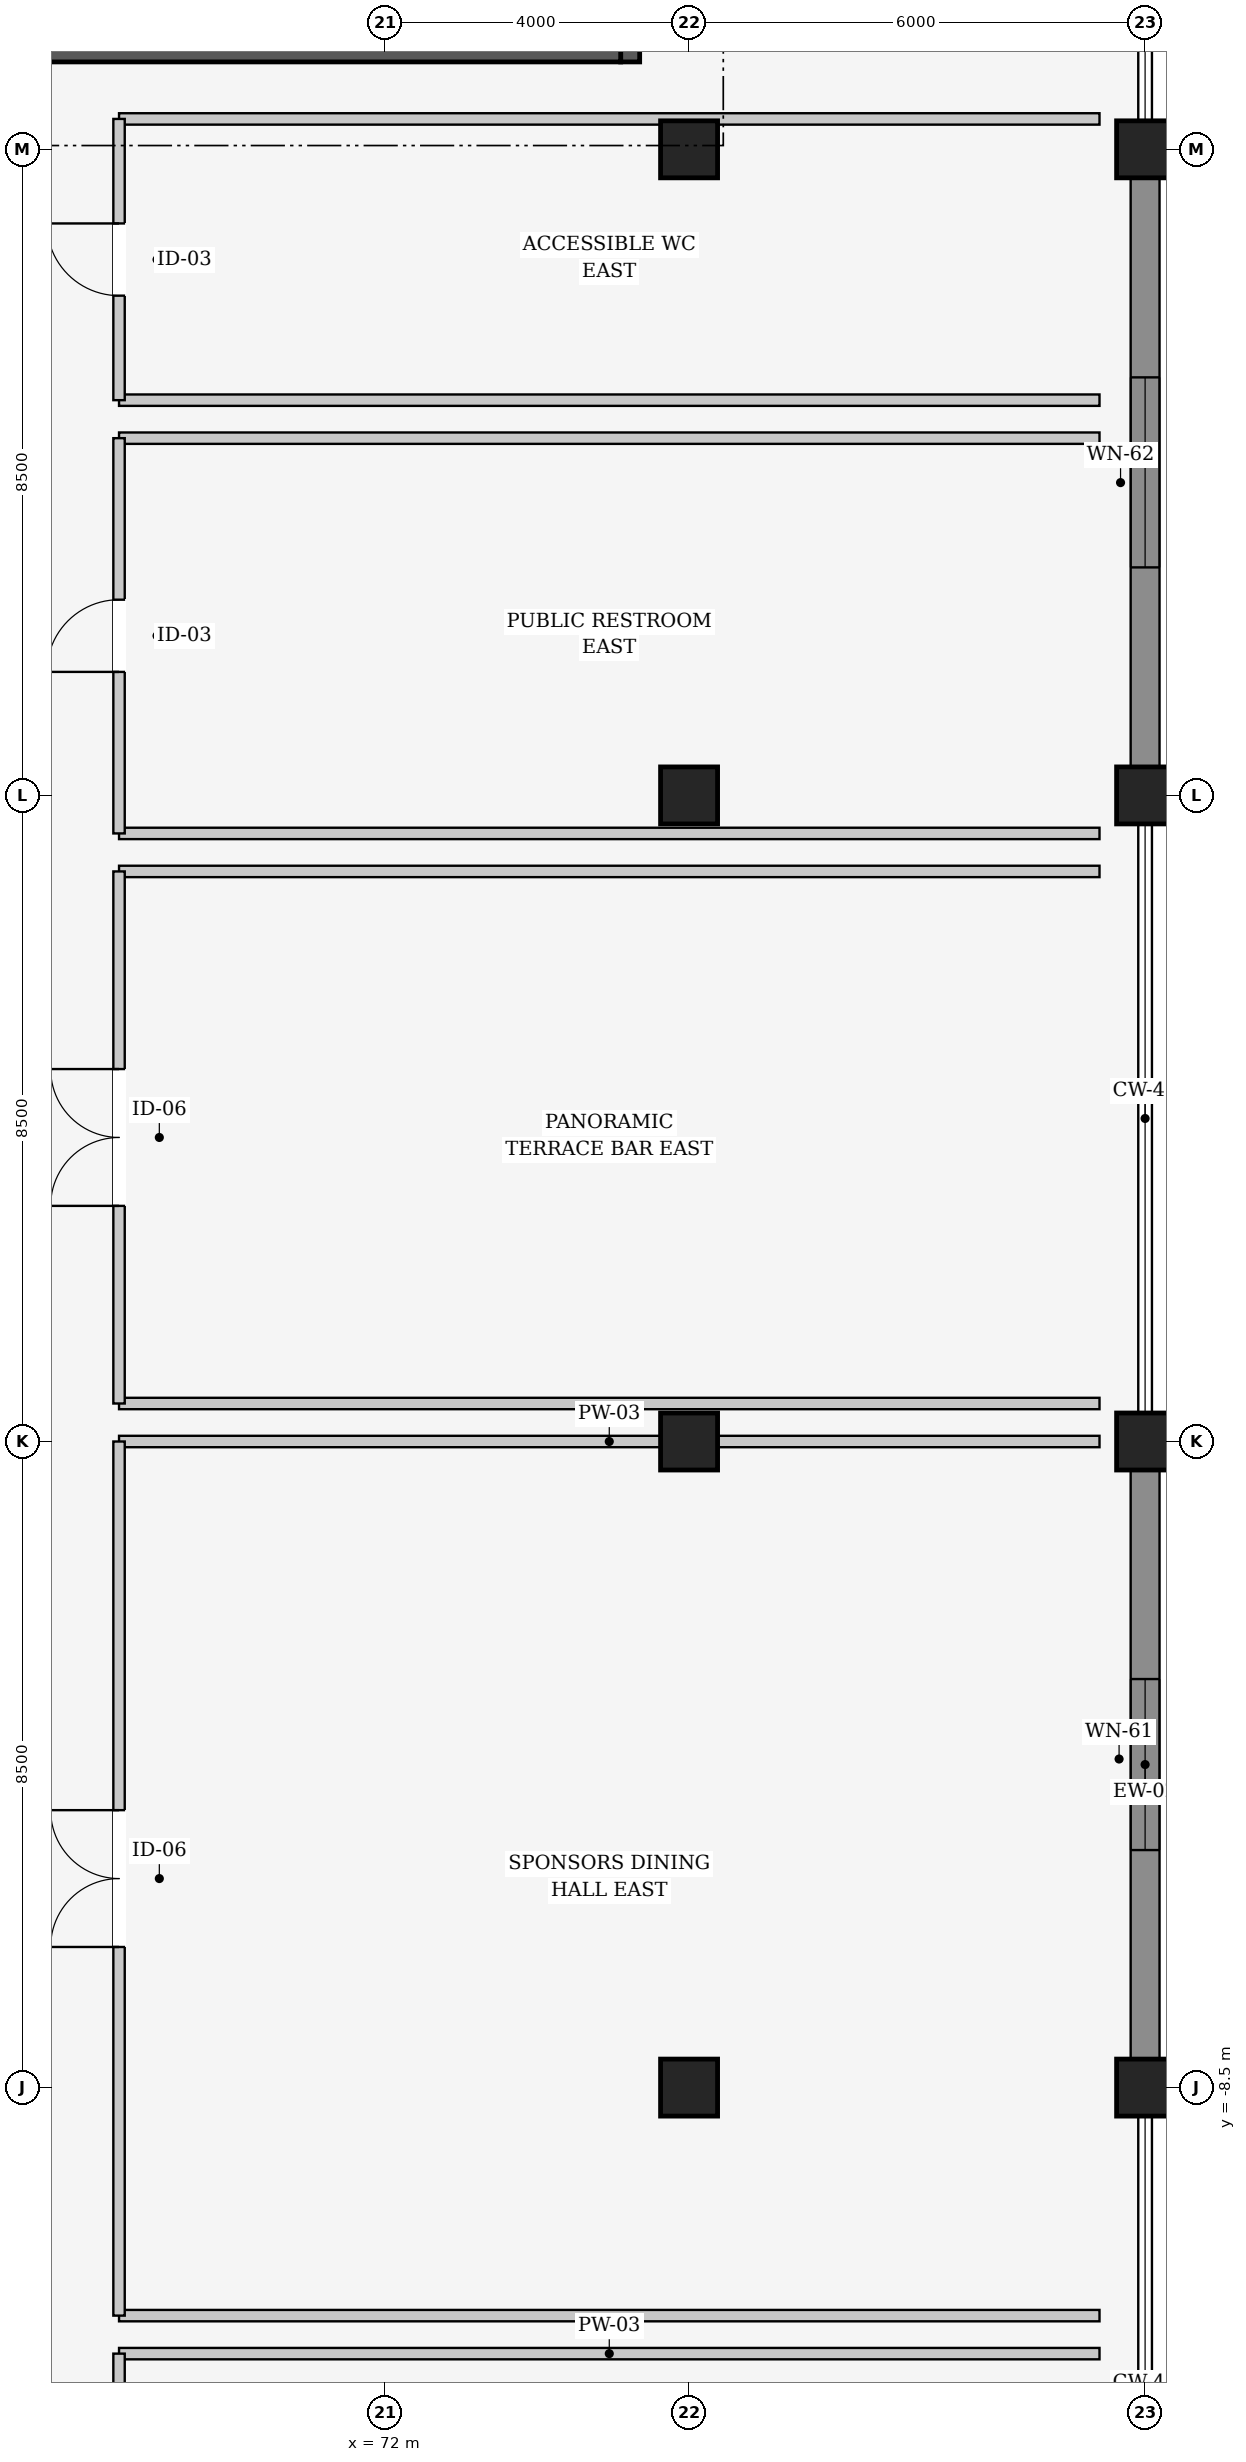
"""IFC4 building model, lengths in metres.
Left out: names, types, materials, properties, quantities, classifications, styles, units other than length and angle.
Written with IfcOpenShell. Run it as: python <this file> out.ifc"""

import sys

from ifc_helpers import new_model, si_unit, direction, frame, frame_2d, origin, origin_2d, place, context, subcontext, project, spatial, rectangle, extrude, element, fill, save


model = new_model("IFC4")
c1 = context("Model", 3, precision=1e-05, world=origin(), true_north=direction((0.0, 1.0)))
c2 = subcontext(c1, "Body", "Model", "MODEL_VIEW")
j1 = project(units=[si_unit("LENGTHUNIT", "METRE"), si_unit("PLANEANGLEUNIT", "RADIAN")], contexts=[c1])
p1 = place(None, origin())
s1 = spatial("IfcSite", under=j1, at=p1, CompositionType="ELEMENT")
p2 = place(p1, origin())
s2 = spatial("IfcBuilding", under=s1, at=p2, CompositionType="ELEMENT")
p3 = place(p2, frame((0.0, 0.0, 21.0)))
s3 = spatial("IfcBuildingStorey", under=s2, at=p3, CompositionType="ELEMENT", Elevation=21.0)
for number, where, z_axis, x_axis in (
    (1, (76.0, -8.5, 0.0), (0.0, 0.0, 1.0), (1.0, 0.0, 0.0)),
    (2, (76.0, 0.0, 0.0), (0.0, 0.0, 1.0), (1.0, 0.0, 0.0)),
    (3, (76.0, 8.5, 0.0), (0.0, 0.0, 1.0), (1.0, 0.0, 0.0)),
    (4, (76.0, 17.0, 0.0), (0.0, 0.0, 1.0), (1.0, 0.0, 0.0)),
    (5, (82.0, -8.5, 0.0), (0.0, 0.0, 1.0), (1.0, 0.0, 0.0)),
    (6, (82.0, 0.0, 0.0), (0.0, 0.0, 1.0), (1.0, 0.0, 0.0)),
    (7, (82.0, 8.5, 0.0), (0.0, 0.0, 1.0), (1.0, 0.0, 0.0)),
    (8, (82.0, 17.0, 0.0), (0.0, 0.0, 1.0), (1.0, 0.0, 0.0)),
):
    element("IfcColumn", number, at=place(p3, frame(where, z_axis=z_axis, x_axis=x_axis)), inside=s3, PredefinedType="COLUMN", context=c2, shape_type="SweptSolid", body=[
        extrude(rectangle(XDim=0.75, YDim=0.75, at=origin_2d()), origin(), (0.0, 0.0, 1.0), 5.4),
    ])
p4 = place(p3, frame((82.0, -0.357, 0.0), z_axis=(0.0, 0.0, 1.0), x_axis=(0.0, -1.0, 0.0)))
e9 = element("IfcWall", 9, at=p4, inside=s3, PredefinedType="SOLIDWALL", context=c2, shape_type="SweptSolid", body=[
    extrude(rectangle(XDim=7.786, YDim=0.38, at=frame_2d((3.893, 0.0))), origin(), (0.0, 0.0, 1.0), 4.36),
])
p5 = place(p4, frame((2.768, 0.0, 0.9)))
e10 = element("IfcOpeningElement", 10, at=p5, cuts=e9, PredefinedType="OPENING", context=c2, shape_type="SweptSolid", body=[
    extrude(rectangle(XDim=2.25, YDim=2.8, at=frame_2d((1.125, 1.4))), frame((0.0, 0.2, 0.0), z_axis=(0.0, -1.0, 0.0), x_axis=(1.0, 0.0, 0.0)), (0.0, 0.0, 1.0), 0.4),
])
p6 = place(p3, frame((82.0, 16.643, 0.0), z_axis=(0.0, 0.0, 1.0), x_axis=(0.0, -1.0, 0.0)))
e11 = element("IfcWall", 11, at=p6, inside=s3, PredefinedType="SOLIDWALL", context=c2, shape_type="SweptSolid", body=[
    extrude(rectangle(XDim=7.786, YDim=0.38, at=frame_2d((3.893, 0.0))), origin(), (0.0, 0.0, 1.0), 4.36),
])
p7 = place(p6, frame((2.643, 0.0, 0.9)))
e12 = element("IfcOpeningElement", 12, at=p7, cuts=e11, PredefinedType="OPENING", context=c2, shape_type="SweptSolid", body=[
    extrude(rectangle(XDim=2.5, YDim=2.8, at=frame_2d((1.25, 1.4))), frame((0.0, 0.2, 0.0), z_axis=(0.0, -1.0, 0.0), x_axis=(1.0, 0.0, 0.0)), (0.0, 0.0, 1.0), 0.4),
])
p8 = place(p3, frame((75.225, 23.85, 0.0), z_axis=(0.0, 0.0, 1.0), x_axis=(0.0, -1.0, 0.0)))
e13 = element("IfcWall", 13, at=p8, inside=s3, PredefinedType="SHEAR", context=c2, shape_type="SweptSolid", body=[
    extrude(rectangle(XDim=5.7, YDim=0.25, at=frame_2d((2.85, 0.0))), origin(), (0.0, 0.0, 1.0), 5.4),
])
p9 = place(p3, frame((75.1, 18.275, 0.0), z_axis=(0.0, 0.0, 1.0), x_axis=(-1.0, 0.0, 0.0)))
e14 = element("IfcWall", 14, at=p9, inside=s3, PredefinedType="SHEAR", context=c2, shape_type="SweptSolid", body=[
    extrude(rectangle(XDim=10.2, YDim=0.25, at=frame_2d((5.1, 0.0))), origin(), (0.0, 0.0, 1.0), 5.4),
])
p10 = place(p3, frame((68.5, -12.0, 0.0), z_axis=(0.0, 0.0, 1.0), x_axis=(1.0, 0.0, 0.0)))
e15 = element("IfcWall", 15, at=p10, inside=s3, PredefinedType="PARTITIONING", context=c2, shape_type="SweptSolid", body=[
    extrude(rectangle(XDim=12.9, YDim=0.15, at=frame_2d((6.45, 0.0))), origin(), (0.0, 0.0, 1.0), 4.445),
])
p11 = place(p3, frame((68.5, -24.4, 0.0), z_axis=(0.0, 0.0, 1.0), x_axis=(0.0, 1.0, 0.0)))
e16 = element("IfcWall", 16, at=p11, inside=s3, PredefinedType="PARTITIONING", context=c2, shape_type="SweptSolid", body=[
    extrude(rectangle(XDim=12.4, YDim=0.15, at=frame_2d((6.2, 0.0))), origin(), (0.0, 0.0, 1.0), 4.145),
])
p12 = place(p11, frame((5.3, 0.0, 0.0)))
e17 = element("IfcOpeningElement", 17, at=p12, cuts=e16, PredefinedType="OPENING", context=c2, shape_type="SweptSolid", body=[
    extrude(rectangle(XDim=1.8, YDim=2.2, at=frame_2d((0.9, 1.1))), frame((0.0, 0.085, 0.0), z_axis=(0.0, -1.0, 0.0), x_axis=(1.0, 0.0, 0.0)), (0.0, 0.0, 1.0), 0.17),
])
p13 = place(p3, frame((68.5, 0.0, 0.0), z_axis=(0.0, 0.0, 1.0), x_axis=(1.0, 0.0, 0.0)))
e18 = element("IfcWall", 18, at=p13, inside=s3, PredefinedType="PARTITIONING", context=c2, shape_type="SweptSolid", body=[
    extrude(rectangle(XDim=12.9, YDim=0.15, at=frame_2d((6.45, 0.0))), origin(), (0.0, 0.0, 1.0), 4.145),
])
p14 = place(p3, frame((81.4, -11.5, 0.0), z_axis=(0.0, 0.0, 1.0), x_axis=(-1.0, 0.0, 0.0)))
e19 = element("IfcWall", 19, at=p14, inside=s3, PredefinedType="PARTITIONING", context=c2, shape_type="SweptSolid", body=[
    extrude(rectangle(XDim=12.9, YDim=0.15, at=frame_2d((6.45, 0.0))), origin(), (0.0, 0.0, 1.0), 4.445),
])
p15 = place(p3, frame((68.5, -11.5, 0.0), z_axis=(0.0, 0.0, 1.0), x_axis=(0.0, 1.0, 0.0)))
e20 = element("IfcWall", 20, at=p15, inside=s3, PredefinedType="PARTITIONING", context=c2, shape_type="SweptSolid", body=[
    extrude(rectangle(XDim=11.5, YDim=0.15, at=frame_2d((5.75, 0.0))), origin(), (0.0, 0.0, 1.0), 4.145),
])
p16 = place(p15, frame((4.85, 0.0, 0.0)))
e21 = element("IfcOpeningElement", 21, at=p16, cuts=e20, PredefinedType="OPENING", context=c2, shape_type="SweptSolid", body=[
    extrude(rectangle(XDim=1.8, YDim=2.2, at=frame_2d((0.9, 1.1))), frame((0.0, 0.085, 0.0), z_axis=(0.0, -1.0, 0.0), x_axis=(1.0, 0.0, 0.0)), (0.0, 0.0, 1.0), 0.17),
])
p17 = place(p3, frame((68.5, 7.5, 0.0), z_axis=(0.0, 0.0, 1.0), x_axis=(1.0, 0.0, 0.0)))
e22 = element("IfcWall", 22, at=p17, inside=s3, PredefinedType="PARTITIONING", context=c2, shape_type="SweptSolid", body=[
    extrude(rectangle(XDim=12.9, YDim=0.15, at=frame_2d((6.45, 0.0))), origin(), (0.0, 0.0, 1.0), 4.445),
])
p18 = place(p3, frame((81.4, 0.5, 0.0), z_axis=(0.0, 0.0, 1.0), x_axis=(-1.0, 0.0, 0.0)))
e23 = element("IfcWall", 23, at=p18, inside=s3, PredefinedType="PARTITIONING", context=c2, shape_type="SweptSolid", body=[
    extrude(rectangle(XDim=12.9, YDim=0.15, at=frame_2d((6.45, 0.0))), origin(), (0.0, 0.0, 1.0), 4.145),
])
p19 = place(p3, frame((68.5, 0.5, 0.0), z_axis=(0.0, 0.0, 1.0), x_axis=(0.0, 1.0, 0.0)))
e24 = element("IfcWall", 24, at=p19, inside=s3, PredefinedType="PARTITIONING", context=c2, shape_type="SweptSolid", body=[
    extrude(rectangle(XDim=7.0, YDim=0.15, at=frame_2d((3.5, 0.0))), origin(), (0.0, 0.0, 1.0), 4.145),
])
p20 = place(p19, frame((2.6, 0.0, 0.0)))
e25 = element("IfcOpeningElement", 25, at=p20, cuts=e24, PredefinedType="OPENING", context=c2, shape_type="SweptSolid", body=[
    extrude(rectangle(XDim=1.8, YDim=2.2, at=frame_2d((0.9, 1.1))), frame((0.0, 0.085, 0.0), z_axis=(0.0, -1.0, 0.0), x_axis=(1.0, 0.0, 0.0)), (0.0, 0.0, 1.0), 0.17),
])
p21 = place(p3, frame((68.5, 13.2, 0.0), z_axis=(0.0, 0.0, 1.0), x_axis=(1.0, 0.0, 0.0)))
e26 = element("IfcWall", 26, at=p21, inside=s3, PredefinedType="PARTITIONING", context=c2, shape_type="SweptSolid", body=[
    extrude(rectangle(XDim=12.9, YDim=0.15, at=frame_2d((6.45, 0.0))), origin(), (0.0, 0.0, 1.0), 4.445),
])
p22 = place(p3, frame((81.4, 8.0, 0.0), z_axis=(0.0, 0.0, 1.0), x_axis=(-1.0, 0.0, 0.0)))
e27 = element("IfcWall", 27, at=p22, inside=s3, PredefinedType="PARTITIONING", context=c2, shape_type="SweptSolid", body=[
    extrude(rectangle(XDim=12.9, YDim=0.15, at=frame_2d((6.45, 0.0))), origin(), (0.0, 0.0, 1.0), 4.145),
])
p23 = place(p3, frame((68.5, 8.0, 0.0), z_axis=(0.0, 0.0, 1.0), x_axis=(0.0, 1.0, 0.0)))
e28 = element("IfcWall", 28, at=p23, inside=s3, PredefinedType="PARTITIONING", context=c2, shape_type="SweptSolid", body=[
    extrude(rectangle(XDim=5.2, YDim=0.15, at=frame_2d((2.6, 0.0))), origin(), (0.0, 0.0, 1.0), 4.145),
])
p24 = place(p23, frame((2.125, 0.0, 0.0)))
e29 = element("IfcOpeningElement", 29, at=p24, cuts=e28, PredefinedType="OPENING", context=c2, shape_type="SweptSolid", body=[
    extrude(rectangle(XDim=0.95, YDim=2.15, at=frame_2d((0.475, 1.075))), frame((0.0, 0.085, 0.0), z_axis=(0.0, -1.0, 0.0), x_axis=(1.0, 0.0, 0.0)), (0.0, 0.0, 1.0), 0.17),
])
p25 = place(p3, frame((68.5, 17.4, 0.0), z_axis=(0.0, 0.0, 1.0), x_axis=(1.0, 0.0, 0.0)))
e30 = element("IfcWall", 30, at=p25, inside=s3, PredefinedType="PARTITIONING", context=c2, shape_type="SweptSolid", body=[
    extrude(rectangle(XDim=12.9, YDim=0.15, at=frame_2d((6.45, 0.0))), origin(), (0.0, 0.0, 1.0), 4.145),
])
p26 = place(p3, frame((81.4, 13.7, 0.0), z_axis=(0.0, 0.0, 1.0), x_axis=(-1.0, 0.0, 0.0)))
e31 = element("IfcWall", 31, at=p26, inside=s3, PredefinedType="PARTITIONING", context=c2, shape_type="SweptSolid", body=[
    extrude(rectangle(XDim=12.9, YDim=0.15, at=frame_2d((6.45, 0.0))), origin(), (0.0, 0.0, 1.0), 4.445),
])
p27 = place(p3, frame((68.5, 13.7, 0.0), z_axis=(0.0, 0.0, 1.0), x_axis=(0.0, 1.0, 0.0)))
e32 = element("IfcWall", 32, at=p27, inside=s3, PredefinedType="PARTITIONING", context=c2, shape_type="SweptSolid", body=[
    extrude(rectangle(XDim=3.7, YDim=0.15, at=frame_2d((1.85, 0.0))), origin(), (0.0, 0.0, 1.0), 4.145),
])
p28 = place(p27, frame((1.375, 0.0, 0.0)))
e33 = element("IfcOpeningElement", 33, at=p28, cuts=e32, PredefinedType="OPENING", context=c2, shape_type="SweptSolid", body=[
    extrude(rectangle(XDim=0.95, YDim=2.15, at=frame_2d((0.475, 1.075))), frame((0.0, 0.085, 0.0), z_axis=(0.0, -1.0, 0.0), x_axis=(1.0, 0.0, 0.0)), (0.0, 0.0, 1.0), 0.17),
])
p29 = place(p5, origin())
e34 = element("IfcWindow", 34, at=p29, inside=s3, PartitioningType="SINGLE_PANEL", PredefinedType="WINDOW", context=c2, shape_type="SweptSolid", body=[
    extrude(rectangle(XDim=2.25, YDim=2.8, at=frame_2d((1.125, 1.4))), frame((0.0, 0.03, 0.0), z_axis=(0.0, -1.0, 0.0), x_axis=(1.0, 0.0, 0.0)), (0.0, 0.0, 1.0), 0.06),
])
fill(e10, e34)
p30 = place(p7, origin())
e35 = element("IfcWindow", 35, at=p30, inside=s3, PartitioningType="SINGLE_PANEL", PredefinedType="WINDOW", context=c2, shape_type="SweptSolid", body=[
    extrude(rectangle(XDim=2.5, YDim=2.8, at=frame_2d((1.25, 1.4))), frame((0.0, 0.03, 0.0), z_axis=(0.0, -1.0, 0.0), x_axis=(1.0, 0.0, 0.0)), (0.0, 0.0, 1.0), 0.06),
])
fill(e12, e35)
p31 = place(p16, origin())
e36 = element("IfcDoor", 36, at=p31, inside=s3, OperationType="DOUBLE_DOOR_SINGLE_SWING", PredefinedType="DOOR", context=c2, shape_type="SweptSolid", body=[
    extrude(rectangle(XDim=1.8, YDim=2.2, at=frame_2d((0.9, 1.1))), frame((0.0, 0.025, 0.0), z_axis=(0.0, -1.0, 0.0), x_axis=(1.0, 0.0, 0.0)), (0.0, 0.0, 1.0), 0.05),
])
fill(e21, e36)
p32 = place(p20, origin())
e37 = element("IfcDoor", 37, at=p32, inside=s3, OperationType="DOUBLE_DOOR_SINGLE_SWING", PredefinedType="DOOR", context=c2, shape_type="SweptSolid", body=[
    extrude(rectangle(XDim=1.8, YDim=2.2, at=frame_2d((0.9, 1.1))), frame((0.0, 0.025, 0.0), z_axis=(0.0, -1.0, 0.0), x_axis=(1.0, 0.0, 0.0)), (0.0, 0.0, 1.0), 0.05),
])
fill(e25, e37)
p33 = place(p24, origin())
e38 = element("IfcDoor", 38, at=p33, inside=s3, OperationType="SINGLE_SWING_LEFT", PredefinedType="DOOR", context=c2, shape_type="SweptSolid", body=[
    extrude(rectangle(XDim=0.95, YDim=2.15, at=frame_2d((0.475, 1.075))), frame((0.0, 0.025, 0.0), z_axis=(0.0, -1.0, 0.0), x_axis=(1.0, 0.0, 0.0)), (0.0, 0.0, 1.0), 0.05),
])
fill(e29, e38)
p34 = place(p28, origin())
e39 = element("IfcDoor", 39, at=p34, inside=s3, OperationType="SINGLE_SWING_RIGHT", PredefinedType="DOOR", context=c2, shape_type="SweptSolid", body=[
    extrude(rectangle(XDim=0.95, YDim=2.15, at=frame_2d((0.475, 1.075))), frame((0.0, 0.025, 0.0), z_axis=(0.0, -1.0, 0.0), x_axis=(1.0, 0.0, 0.0)), (0.0, 0.0, 1.0), 0.05),
])
fill(e33, e39)
save(model, sys.argv[1])
